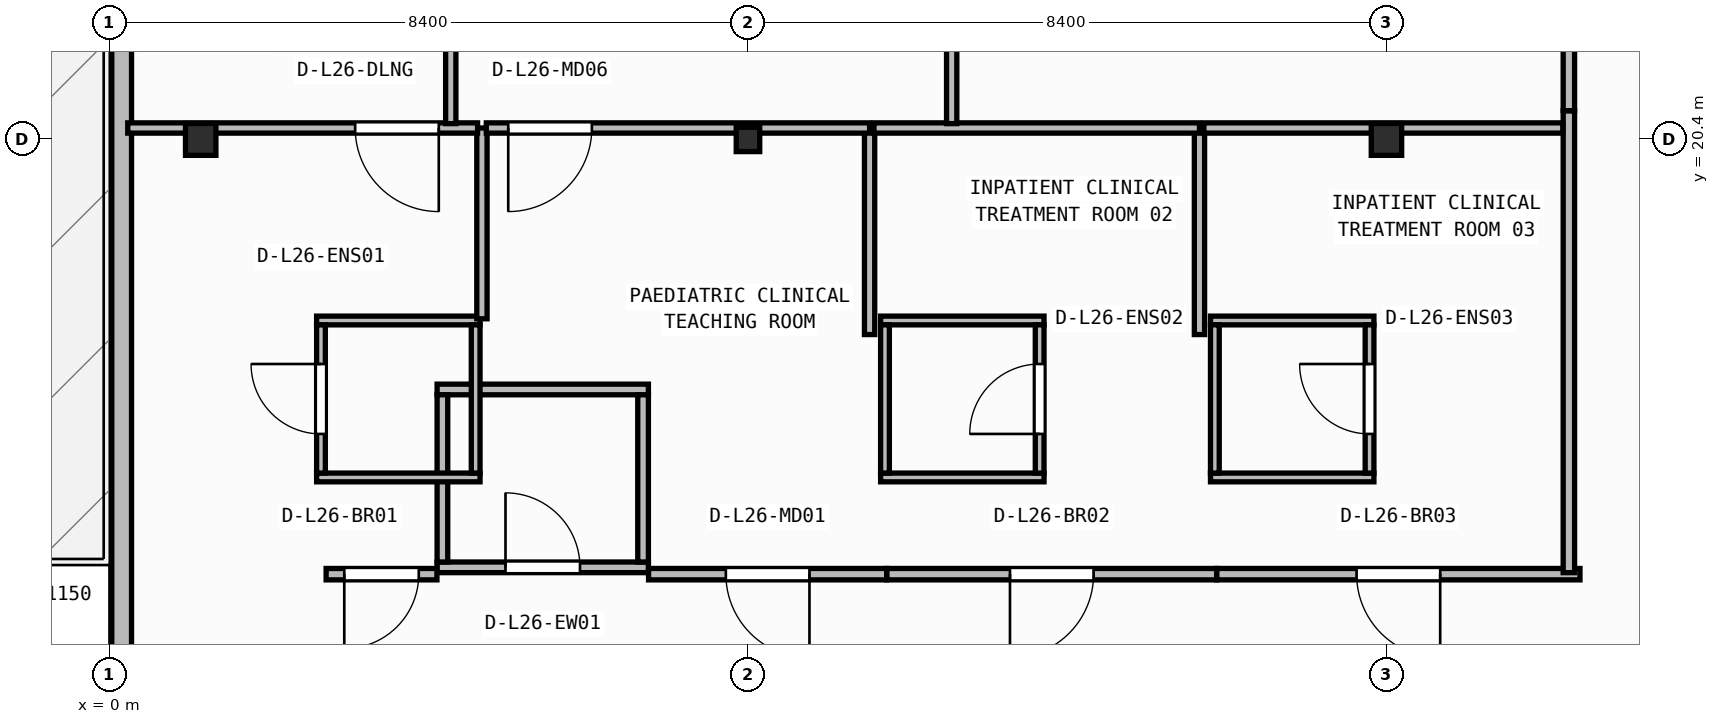
"""IFC4 building model, lengths in metres.
Left out: names, types, materials, properties, quantities, classifications, styles, units other than length and angle.
Written with IfcOpenShell. Run it as: python <this file> out.ifc"""

import sys

from ifc_helpers import new_model, si_unit, direction, frame, frame_2d, origin, origin_2d, place, context, subcontext, project, spatial, rectangle, i_section, extrude, element, fill, save


model = new_model("IFC4")
c1 = context("Model", 3, precision=1e-05, world=origin(), true_north=direction((0.0, 1.0)))
c2 = subcontext(c1, "Body", "Model", "MODEL_VIEW")
j1 = project(units=[si_unit("LENGTHUNIT", "METRE"), si_unit("PLANEANGLEUNIT", "RADIAN")], contexts=[c1])
p1 = place(None, origin())
s1 = spatial("IfcSite", under=j1, at=p1, CompositionType="ELEMENT")
p2 = place(p1, origin())
s2 = spatial("IfcBuilding", under=s1, at=p2, CompositionType="ELEMENT")
p3 = place(p2, frame((0.0, 0.0, 107.3)))
s3 = spatial("IfcBuildingStorey", under=s2, at=p3, CompositionType="ELEMENT", Elevation=107.3)
p4 = place(p3, frame((1.2, 20.4, 0.0), z_axis=(0.0, 0.0, 1.0), x_axis=(1.0, 0.0, 0.0)))
e1 = element("IfcColumn", 1, at=p4, inside=s3, PredefinedType="COLUMN", context=c2, shape_type="SweptSolid", body=[
    extrude(i_section(OverallWidth=0.4, OverallDepth=0.42, WebThickness=0.025, FlangeThickness=0.04, at=origin_2d()), origin(), (0.0, 0.0, 1.0), 3.95),
])
p5 = place(p3, frame((8.4, 20.4, 0.0), z_axis=(0.0, 0.0, 1.0), x_axis=(1.0, 0.0, 0.0)))
e2 = element("IfcColumn", 2, at=p5, inside=s3, PredefinedType="COLUMN", context=c2, shape_type="SweptSolid", body=[
    extrude(i_section(OverallWidth=0.309, OverallDepth=0.321, WebThickness=0.014, FlangeThickness=0.022, FilletRadius=0.017, at=origin_2d()), origin(), (0.0, 0.0, 1.0), 3.95),
])
p6 = place(p3, frame((16.8, 20.4, 0.0), z_axis=(0.0, 0.0, 1.0), x_axis=(1.0, 0.0, 0.0)))
e3 = element("IfcColumn", 3, at=p6, inside=s3, PredefinedType="COLUMN", context=c2, shape_type="SweptSolid", body=[
    extrude(i_section(OverallWidth=0.4, OverallDepth=0.42, WebThickness=0.025, FlangeThickness=0.04, at=origin_2d()), origin(), (0.0, 0.0, 1.0), 3.95),
])
p7 = place(p3, frame((0.16, 40.64, 0.0), z_axis=(0.0, 0.0, 1.0), x_axis=(0.0, -1.0, 0.0)))
e4 = element("IfcWall", 4, at=p7, inside=s3, PredefinedType="STANDARD", context=c2, shape_type="SweptSolid", body=[
    extrude(rectangle(XDim=37.88, YDim=0.26, at=frame_2d((18.94, 0.0))), origin(), (0.0, 0.0, 1.0), 3.71),
])
p8 = place(p7, frame((14.081, 0.0, 0.0)))
e5 = element("IfcOpeningElement", 5, at=p8, cuts=e4, PredefinedType="OPENING", context=c2, shape_type="SweptSolid", body=[
    extrude(rectangle(XDim=1.3, YDim=2.15, at=frame_2d((0.65, 1.075))), frame((0.0, 0.14, 0.0), z_axis=(0.0, -1.0, 0.0), x_axis=(1.0, 0.0, 0.0)), (0.0, 0.0, 1.0), 0.28),
])
p9 = place(p3, frame((4.31, 14.77, 0.0), z_axis=(0.0, 0.0, 1.0), x_axis=(1.0, 0.0, 0.0)))
e6 = element("IfcWall", 6, at=p9, inside=s3, PredefinedType="PARTITIONING", context=c2, shape_type="SweptSolid", body=[
    extrude(rectangle(XDim=2.78, YDim=0.14, at=frame_2d((1.39, 0.0))), origin(), (0.0, 0.0, 1.0), 3.71),
])
p10 = place(p9, frame((0.9, 0.0, 0.0)))
e7 = element("IfcOpeningElement", 7, at=p10, cuts=e6, PredefinedType="OPENING", context=c2, shape_type="SweptSolid", body=[
    extrude(rectangle(XDim=0.98, YDim=2.1, at=frame_2d((0.49, 1.05))), frame((0.0, 0.08, 0.0), z_axis=(0.0, -1.0, 0.0), x_axis=(1.0, 0.0, 0.0)), (0.0, 0.0, 1.0), 0.16),
])
p11 = place(p3, frame((4.31, 17.11, 0.0), z_axis=(0.0, 0.0, 1.0), x_axis=(1.0, 0.0, 0.0)))
e8 = element("IfcWall", 8, at=p11, inside=s3, PredefinedType="PARTITIONING", context=c2, shape_type="SweptSolid", body=[
    extrude(rectangle(XDim=2.78, YDim=0.14, at=frame_2d((1.39, 0.0))), origin(), (0.0, 0.0, 1.0), 3.71),
])
for number, where, z_axis, x_axis in (
    (9, (4.38, 14.84, 0.0), (0.0, 0.0, 1.0), (0.0, 1.0, 0.0)),
    (10, (7.02, 14.84, 0.0), (0.0, 0.0, 1.0), (0.0, 1.0, 0.0)),
):
    element("IfcWall", number, at=place(p3, frame(where, z_axis=z_axis, x_axis=x_axis)), inside=s3, PredefinedType="PARTITIONING", context=c2, shape_type="SweptSolid", body=[
        extrude(rectangle(XDim=2.2, YDim=0.14, at=frame_2d((1.1, 0.0))), origin(), (0.0, 0.0, 1.0), 3.71),
    ])
for number, where, z_axis, x_axis in (
    (11, (2.725, 15.952, 0.0), (0.0, 0.0, 1.0), (1.0, 0.0, 0.0)),
    (12, (2.725, 18.018, 0.0), (0.0, 0.0, 1.0), (1.0, 0.0, 0.0)),
):
    element("IfcWall", number, at=place(p3, frame(where, z_axis=z_axis, x_axis=x_axis)), inside=s3, PredefinedType="PARTITIONING", context=c2, shape_type="SweptSolid", body=[
        extrude(rectangle(XDim=2.15, YDim=0.115, at=frame_2d((1.075, 0.0))), origin(), (0.0, 0.0, 1.0), 3.71),
    ])
p12 = place(p3, frame((2.782, 16.01, 0.0), z_axis=(0.0, 0.0, 1.0), x_axis=(0.0, 1.0, 0.0)))
e13 = element("IfcWall", 13, at=p12, inside=s3, PredefinedType="PARTITIONING", context=c2, shape_type="SweptSolid", body=[
    extrude(rectangle(XDim=1.95, YDim=0.115, at=frame_2d((0.975, 0.0))), origin(), (0.0, 0.0, 1.0), 3.71),
])
p13 = place(p12, frame((0.515, 0.0, 0.0)))
e14 = element("IfcOpeningElement", 14, at=p13, cuts=e13, PredefinedType="OPENING", context=c2, shape_type="SweptSolid", body=[
    extrude(rectangle(XDim=0.92, YDim=2.1, at=frame_2d((0.46, 1.05))), frame((0.0, 0.067, 0.0), z_axis=(0.0, -1.0, 0.0), x_axis=(1.0, 0.0, 0.0)), (0.0, 0.0, 1.0), 0.135),
])
p14 = place(p3, frame((4.817, 16.01, 0.0), z_axis=(0.0, 0.0, 1.0), x_axis=(0.0, 1.0, 0.0)))
e15 = element("IfcWall", 15, at=p14, inside=s3, PredefinedType="PARTITIONING", context=c2, shape_type="SweptSolid", body=[
    extrude(rectangle(XDim=1.95, YDim=0.115, at=frame_2d((0.975, 0.0))), origin(), (0.0, 0.0, 1.0), 3.71),
])
for number, where, z_axis, x_axis in (
    (16, (10.145, 15.952, 0.0), (0.0, 0.0, 1.0), (1.0, 0.0, 0.0)),
    (17, (10.145, 18.018, 0.0), (0.0, 0.0, 1.0), (1.0, 0.0, 0.0)),
):
    element("IfcWall", number, at=place(p3, frame(where, z_axis=z_axis, x_axis=x_axis)), inside=s3, PredefinedType="PARTITIONING", context=c2, shape_type="SweptSolid", body=[
        extrude(rectangle(XDim=2.15, YDim=0.115, at=frame_2d((1.075, 0.0))), origin(), (0.0, 0.0, 1.0), 3.71),
    ])
p15 = place(p3, frame((10.202, 16.01, 0.0), z_axis=(0.0, 0.0, 1.0), x_axis=(0.0, 1.0, 0.0)))
e18 = element("IfcWall", 18, at=p15, inside=s3, PredefinedType="PARTITIONING", context=c2, shape_type="SweptSolid", body=[
    extrude(rectangle(XDim=1.95, YDim=0.115, at=frame_2d((0.975, 0.0))), origin(), (0.0, 0.0, 1.0), 3.71),
])
p16 = place(p3, frame((12.238, 16.01, 0.0), z_axis=(0.0, 0.0, 1.0), x_axis=(0.0, 1.0, 0.0)))
e19 = element("IfcWall", 19, at=p16, inside=s3, PredefinedType="PARTITIONING", context=c2, shape_type="SweptSolid", body=[
    extrude(rectangle(XDim=1.95, YDim=0.115, at=frame_2d((0.975, 0.0))), origin(), (0.0, 0.0, 1.0), 3.71),
])
p17 = place(p16, frame((0.515, 0.0, 0.0)))
e20 = element("IfcOpeningElement", 20, at=p17, cuts=e19, PredefinedType="OPENING", context=c2, shape_type="SweptSolid", body=[
    extrude(rectangle(XDim=0.92, YDim=2.1, at=frame_2d((0.46, 1.05))), frame((0.0, 0.067, 0.0), z_axis=(0.0, -1.0, 0.0), x_axis=(1.0, 0.0, 0.0)), (0.0, 0.0, 1.0), 0.135),
])
for number, where, z_axis, x_axis in (
    (21, (14.485, 15.952, 0.0), (0.0, 0.0, 1.0), (1.0, 0.0, 0.0)),
    (22, (14.485, 18.018, 0.0), (0.0, 0.0, 1.0), (1.0, 0.0, 0.0)),
):
    element("IfcWall", number, at=place(p3, frame(where, z_axis=z_axis, x_axis=x_axis)), inside=s3, PredefinedType="PARTITIONING", context=c2, shape_type="SweptSolid", body=[
        extrude(rectangle(XDim=2.15, YDim=0.115, at=frame_2d((1.075, 0.0))), origin(), (0.0, 0.0, 1.0), 3.71),
    ])
p18 = place(p3, frame((14.542, 16.01, 0.0), z_axis=(0.0, 0.0, 1.0), x_axis=(0.0, 1.0, 0.0)))
e23 = element("IfcWall", 23, at=p18, inside=s3, PredefinedType="PARTITIONING", context=c2, shape_type="SweptSolid", body=[
    extrude(rectangle(XDim=1.95, YDim=0.115, at=frame_2d((0.975, 0.0))), origin(), (0.0, 0.0, 1.0), 3.71),
])
p19 = place(p3, frame((16.577, 16.01, 0.0), z_axis=(0.0, 0.0, 1.0), x_axis=(0.0, 1.0, 0.0)))
e24 = element("IfcWall", 24, at=p19, inside=s3, PredefinedType="PARTITIONING", context=c2, shape_type="SweptSolid", body=[
    extrude(rectangle(XDim=1.95, YDim=0.115, at=frame_2d((0.975, 0.0))), origin(), (0.0, 0.0, 1.0), 3.71),
])
p20 = place(p19, frame((0.515, 0.0, 0.0)))
e25 = element("IfcOpeningElement", 25, at=p20, cuts=e24, PredefinedType="OPENING", context=c2, shape_type="SweptSolid", body=[
    extrude(rectangle(XDim=0.92, YDim=2.1, at=frame_2d((0.46, 1.05))), frame((0.0, 0.067, 0.0), z_axis=(0.0, -1.0, 0.0), x_axis=(1.0, 0.0, 0.0)), (0.0, 0.0, 1.0), 0.135),
])
p21 = place(p3, frame((4.308, 14.68, 0.0), z_axis=(0.0, 0.0, 1.0), x_axis=(-1.0, 0.0, 0.0)))
e26 = element("IfcWall", 26, at=p21, inside=s3, PredefinedType="PARTITIONING", context=c2, shape_type="SweptSolid", body=[
    extrude(rectangle(XDim=1.458, YDim=0.15, at=frame_2d((0.729, 0.0))), origin(), (0.0, 0.0, 1.0), 3.71),
])
p22 = place(p21, frame((0.239, 0.0, 0.0)))
e27 = element("IfcOpeningElement", 27, at=p22, cuts=e26, PredefinedType="OPENING", context=c2, shape_type="SweptSolid", body=[
    extrude(rectangle(XDim=0.98, YDim=2.1, at=frame_2d((0.49, 1.05))), frame((0.0, 0.085, 0.0), z_axis=(0.0, -1.0, 0.0), x_axis=(1.0, 0.0, 0.0)), (0.0, 0.0, 1.0), 0.17),
])
p23 = place(p3, frame((10.226, 14.68, 0.0), z_axis=(0.0, 0.0, 1.0), x_axis=(-1.0, 0.0, 0.0)))
e28 = element("IfcWall", 28, at=p23, inside=s3, PredefinedType="PARTITIONING", context=c2, shape_type="SweptSolid", body=[
    extrude(rectangle(XDim=3.134, YDim=0.15, at=frame_2d((1.567, 0.0))), origin(), (0.0, 0.0, 1.0), 3.71),
])
p24 = place(p23, frame((1.017, 0.0, 0.0)))
e29 = element("IfcOpeningElement", 29, at=p24, cuts=e28, PredefinedType="OPENING", context=c2, shape_type="SweptSolid", body=[
    extrude(rectangle(XDim=1.1, YDim=2.1, at=frame_2d((0.55, 1.05))), frame((0.0, 0.085, 0.0), z_axis=(0.0, -1.0, 0.0), x_axis=(1.0, 0.0, 0.0)), (0.0, 0.0, 1.0), 0.17),
])
p25 = place(p3, frame((14.566, 14.68, 0.0), z_axis=(0.0, 0.0, 1.0), x_axis=(-1.0, 0.0, 0.0)))
e30 = element("IfcWall", 30, at=p25, inside=s3, PredefinedType="PARTITIONING", context=c2, shape_type="SweptSolid", body=[
    extrude(rectangle(XDim=4.338, YDim=0.15, at=frame_2d((2.169, 0.0))), origin(), (0.0, 0.0, 1.0), 3.71),
])
p26 = place(p25, frame((1.619, 0.0, 0.0)))
e31 = element("IfcOpeningElement", 31, at=p26, cuts=e30, PredefinedType="OPENING", context=c2, shape_type="SweptSolid", body=[
    extrude(rectangle(XDim=1.1, YDim=2.1, at=frame_2d((0.55, 1.05))), frame((0.0, 0.085, 0.0), z_axis=(0.0, -1.0, 0.0), x_axis=(1.0, 0.0, 0.0)), (0.0, 0.0, 1.0), 0.17),
])
p27 = place(p3, frame((19.346, 14.68, 0.0), z_axis=(0.0, 0.0, 1.0), x_axis=(-1.0, 0.0, 0.0)))
e32 = element("IfcWall", 32, at=p27, inside=s3, PredefinedType="PARTITIONING", context=c2, shape_type="SweptSolid", body=[
    extrude(rectangle(XDim=4.778, YDim=0.15, at=frame_2d((2.389, 0.0))), origin(), (0.0, 0.0, 1.0), 3.71),
])
p28 = place(p27, frame((1.839, 0.0, 0.0)))
e33 = element("IfcOpeningElement", 33, at=p28, cuts=e32, PredefinedType="OPENING", context=c2, shape_type="SweptSolid", body=[
    extrude(rectangle(XDim=1.1, YDim=2.1, at=frame_2d((0.55, 1.05))), frame((0.0, 0.085, 0.0), z_axis=(0.0, -1.0, 0.0), x_axis=(1.0, 0.0, 0.0)), (0.0, 0.0, 1.0), 0.17),
])
p29 = place(p3, frame((19.2, 20.776, 0.0), z_axis=(0.0, 0.0, 1.0), x_axis=(0.0, -1.0, 0.0)))
e34 = element("IfcWall", 34, at=p29, inside=s3, PredefinedType="PARTITIONING", context=c2, shape_type="SweptSolid", body=[
    extrude(rectangle(XDim=6.076, YDim=0.15, at=frame_2d((3.038, 0.0))), origin(), (0.0, 0.0, 1.0), 3.71),
])
p30 = place(p3, frame((19.2, 27.26, 0.0), z_axis=(0.0, 0.0, 1.0), x_axis=(0.0, -1.0, 0.0)))
e35 = element("IfcWall", 35, at=p30, inside=s3, PredefinedType="PARTITIONING", context=c2, shape_type="SweptSolid", body=[
    extrude(rectangle(XDim=6.482, YDim=0.15, at=frame_2d((3.241, 0.0))), origin(), (0.0, 0.0, 1.0), 3.71),
])
p31 = place(p30, frame((2.068, 0.0, 0.0)))
e36 = element("IfcOpeningElement", 36, at=p31, cuts=e35, PredefinedType="OPENING", context=c2, shape_type="SweptSolid", body=[
    extrude(rectangle(XDim=1.1, YDim=2.1, at=frame_2d((0.55, 1.05))), frame((0.0, 0.085, 0.0), z_axis=(0.0, -1.0, 0.0), x_axis=(1.0, 0.0, 0.0)), (0.0, 0.0, 1.0), 0.17),
])
p32 = place(p3, frame((4.9, 18.04, 0.0), z_axis=(0.0, 0.0, 1.0), x_axis=(0.0, 1.0, 0.0)))
e37 = element("IfcWall", 37, at=p32, inside=s3, PredefinedType="PARTITIONING", context=c2, shape_type="SweptSolid", body=[
    extrude(rectangle(XDim=2.51, YDim=0.135, at=frame_2d((1.255, 0.0))), origin(), (0.0, 0.0, 1.0), 3.71),
])
p33 = place(p3, frame((4.843, 20.55, 0.0), z_axis=(0.0, 0.0, 1.0), x_axis=(-1.0, 0.0, 0.0)))
e38 = element("IfcWall", 38, at=p33, inside=s3, PredefinedType="PARTITIONING", context=c2, shape_type="SweptSolid", body=[
    extrude(rectangle(XDim=4.603, YDim=0.135, at=frame_2d((2.301, 0.0))), origin(), (0.0, 0.0, 1.0), 3.083),
])
p34 = place(p33, frame((0.51, 0.0, 0.0)))
e39 = element("IfcOpeningElement", 39, at=p34, cuts=e38, PredefinedType="OPENING", context=c2, shape_type="SweptSolid", body=[
    extrude(rectangle(XDim=1.1, YDim=2.1, at=frame_2d((0.55, 1.05))), frame((0.0, 0.077, 0.0), z_axis=(0.0, -1.0, 0.0), x_axis=(1.0, 0.0, 0.0)), (0.0, 0.0, 1.0), 0.155),
])
p35 = place(p3, frame((10.0, 17.833, 0.0), z_axis=(0.0, 0.0, 1.0), x_axis=(0.0, 1.0, 0.0)))
e40 = element("IfcWall", 40, at=p35, inside=s3, PredefinedType="PARTITIONING", context=c2, shape_type="SweptSolid", body=[
    extrude(rectangle(XDim=2.718, YDim=0.135, at=frame_2d((1.359, 0.0))), origin(), (0.0, 0.0, 1.0), 3.71),
])
p36 = place(p3, frame((10.0, 20.55, 0.0), z_axis=(0.0, 0.0, 1.0), x_axis=(-1.0, 0.0, 0.0)))
e41 = element("IfcWall", 41, at=p36, inside=s3, PredefinedType="PARTITIONING", context=c2, shape_type="SweptSolid", body=[
    extrude(rectangle(XDim=5.042, YDim=0.135, at=frame_2d((2.521, 0.0))), origin(), (0.0, 0.0, 1.0), 3.083),
])
p37 = place(p36, frame((3.654, 0.0, 0.0)))
e42 = element("IfcOpeningElement", 42, at=p37, cuts=e41, PredefinedType="OPENING", context=c2, shape_type="SweptSolid", body=[
    extrude(rectangle(XDim=1.1, YDim=2.1, at=frame_2d((0.55, 1.05))), frame((0.0, 0.077, 0.0), z_axis=(0.0, -1.0, 0.0), x_axis=(1.0, 0.0, 0.0)), (0.0, 0.0, 1.0), 0.155),
])
p38 = place(p3, frame((14.34, 17.833, 0.0), z_axis=(0.0, 0.0, 1.0), x_axis=(0.0, 1.0, 0.0)))
e43 = element("IfcWall", 43, at=p38, inside=s3, PredefinedType="PARTITIONING", context=c2, shape_type="SweptSolid", body=[
    extrude(rectangle(XDim=2.718, YDim=0.135, at=frame_2d((1.359, 0.0))), origin(), (0.0, 0.0, 1.0), 3.71),
])
p39 = place(p3, frame((14.34, 20.55, 0.0), z_axis=(0.0, 0.0, 1.0), x_axis=(-1.0, 0.0, 0.0)))
e44 = element("IfcWall", 44, at=p39, inside=s3, PredefinedType="PARTITIONING", context=c2, shape_type="SweptSolid", body=[
    extrude(rectangle(XDim=4.282, YDim=0.135, at=frame_2d((2.141, 0.0))), origin(), (0.0, 0.0, 1.0), 3.083),
])
p40 = place(p3, frame((19.12, 20.55, 0.0), z_axis=(0.0, 0.0, 1.0), x_axis=(-1.0, 0.0, 0.0)))
e45 = element("IfcWall", 45, at=p40, inside=s3, PredefinedType="PARTITIONING", context=c2, shape_type="SweptSolid", body=[
    extrude(rectangle(XDim=4.723, YDim=0.135, at=frame_2d((2.361, 0.0))), origin(), (0.0, 0.0, 1.0), 3.083),
])
for number, where, z_axis, x_axis in (
    (46, (4.49, 20.607, 0.0), (0.0, 0.0, 1.0), (0.0, 1.0, 0.0)),
    (47, (11.08, 20.607, 0.0), (0.0, 0.0, 1.0), (0.0, 1.0, 0.0)),
):
    element("IfcWall", number, at=place(p3, frame(where, z_axis=z_axis, x_axis=x_axis)), inside=s3, PredefinedType="PARTITIONING", context=c2, shape_type="SweptSolid", body=[
        extrude(rectangle(XDim=6.493, YDim=0.135, at=frame_2d((3.246, 0.0))), origin(), (0.0, 0.0, 1.0), 3.71),
    ])
p41 = place(p10, origin())
e48 = element("IfcDoor", 48, at=p41, inside=s3, OperationType="SINGLE_SWING_LEFT", PredefinedType="DOOR", context=c2, shape_type="SweptSolid", body=[
    extrude(rectangle(XDim=0.98, YDim=2.1, at=frame_2d((0.49, 1.05))), frame((0.0, 0.025, 0.0), z_axis=(0.0, -1.0, 0.0), x_axis=(1.0, 0.0, 0.0)), (0.0, 0.0, 1.0), 0.05),
])
fill(e7, e48)
p42 = place(p13, origin())
e49 = element("IfcDoor", 49, at=p42, inside=s3, OperationType="SINGLE_SWING_RIGHT", PredefinedType="DOOR", context=c2, shape_type="SweptSolid", body=[
    extrude(rectangle(XDim=0.92, YDim=2.1, at=frame_2d((0.46, 1.05))), frame((0.0, 0.025, 0.0), z_axis=(0.0, -1.0, 0.0), x_axis=(1.0, 0.0, 0.0)), (0.0, 0.0, 1.0), 0.05),
])
fill(e14, e49)
p43 = place(p17, origin())
e50 = element("IfcDoor", 50, at=p43, inside=s3, OperationType="SINGLE_SWING_LEFT", PredefinedType="DOOR", context=c2, shape_type="SweptSolid", body=[
    extrude(rectangle(XDim=0.92, YDim=2.1, at=frame_2d((0.46, 1.05))), frame((0.0, 0.025, 0.0), z_axis=(0.0, -1.0, 0.0), x_axis=(1.0, 0.0, 0.0)), (0.0, 0.0, 1.0), 0.05),
])
fill(e20, e50)
p44 = place(p20, origin())
e51 = element("IfcDoor", 51, at=p44, inside=s3, OperationType="SINGLE_SWING_RIGHT", PredefinedType="DOOR", context=c2, shape_type="SweptSolid", body=[
    extrude(rectangle(XDim=0.92, YDim=2.1, at=frame_2d((0.46, 1.05))), frame((0.0, 0.025, 0.0), z_axis=(0.0, -1.0, 0.0), x_axis=(1.0, 0.0, 0.0)), (0.0, 0.0, 1.0), 0.05),
])
fill(e25, e51)
p45 = place(p22, origin())
e52 = element("IfcDoor", 52, at=p45, inside=s3, OperationType="SINGLE_SWING_RIGHT", PredefinedType="DOOR", context=c2, shape_type="SweptSolid", body=[
    extrude(rectangle(XDim=0.98, YDim=2.1, at=frame_2d((0.49, 1.05))), frame((0.0, 0.025, 0.0), z_axis=(0.0, -1.0, 0.0), x_axis=(1.0, 0.0, 0.0)), (0.0, 0.0, 1.0), 0.05),
])
fill(e27, e52)
p46 = place(p24, origin())
e53 = element("IfcDoor", 53, at=p46, inside=s3, OperationType="SINGLE_SWING_LEFT", PredefinedType="DOOR", context=c2, shape_type="SweptSolid", body=[
    extrude(rectangle(XDim=1.1, YDim=2.1, at=frame_2d((0.55, 1.05))), frame((0.0, 0.025, 0.0), z_axis=(0.0, -1.0, 0.0), x_axis=(1.0, 0.0, 0.0)), (0.0, 0.0, 1.0), 0.05),
])
fill(e29, e53)
p47 = place(p26, origin())
e54 = element("IfcDoor", 54, at=p47, inside=s3, OperationType="SINGLE_SWING_RIGHT", PredefinedType="DOOR", context=c2, shape_type="SweptSolid", body=[
    extrude(rectangle(XDim=1.1, YDim=2.1, at=frame_2d((0.55, 1.05))), frame((0.0, 0.025, 0.0), z_axis=(0.0, -1.0, 0.0), x_axis=(1.0, 0.0, 0.0)), (0.0, 0.0, 1.0), 0.05),
])
fill(e31, e54)
p48 = place(p28, origin())
e55 = element("IfcDoor", 55, at=p48, inside=s3, OperationType="SINGLE_SWING_LEFT", PredefinedType="DOOR", context=c2, shape_type="SweptSolid", body=[
    extrude(rectangle(XDim=1.1, YDim=2.1, at=frame_2d((0.55, 1.05))), frame((0.0, 0.025, 0.0), z_axis=(0.0, -1.0, 0.0), x_axis=(1.0, 0.0, 0.0)), (0.0, 0.0, 1.0), 0.05),
])
fill(e33, e55)
p49 = place(p34, origin())
e56 = element("IfcDoor", 56, at=p49, inside=s3, OperationType="SINGLE_SWING_LEFT", PredefinedType="DOOR", context=c2, shape_type="SweptSolid", body=[
    extrude(rectangle(XDim=1.1, YDim=2.1, at=frame_2d((0.55, 1.05))), frame((0.0, 0.025, 0.0), z_axis=(0.0, -1.0, 0.0), x_axis=(1.0, 0.0, 0.0)), (0.0, 0.0, 1.0), 0.05),
])
fill(e39, e56)
p50 = place(p37, origin())
e57 = element("IfcDoor", 57, at=p50, inside=s3, OperationType="SINGLE_SWING_RIGHT", PredefinedType="DOOR", context=c2, shape_type="SweptSolid", body=[
    extrude(rectangle(XDim=1.1, YDim=2.1, at=frame_2d((0.55, 1.05))), frame((0.0, 0.025, 0.0), z_axis=(0.0, -1.0, 0.0), x_axis=(1.0, 0.0, 0.0)), (0.0, 0.0, 1.0), 0.05),
])
fill(e42, e57)
save(model, sys.argv[1])
